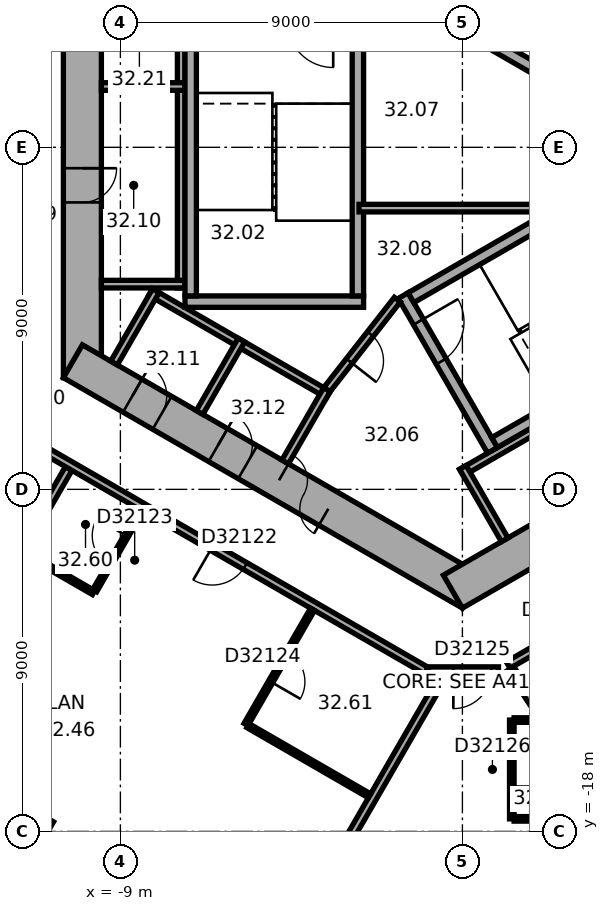
"""IFC4 building model, lengths in metres.
Left out: names, types, materials, properties, quantities, classifications, styles, units other than length and angle.
Written with IfcOpenShell. Run it as: python <this file> out.ifc"""

import sys

from ifc_helpers import new_model, si_unit, direction, frame, frame_2d, origin, origin_2d, place, context, subcontext, project, spatial, rectangle, extrude, element, fill, save


model = new_model("IFC4")
c1 = context("Model", 3, precision=1e-05, world=origin(), true_north=direction((0.0, 1.0)))
c2 = subcontext(c1, "Body", "Model", "MODEL_VIEW")
j1 = project(units=[si_unit("LENGTHUNIT", "METRE"), si_unit("PLANEANGLEUNIT", "RADIAN")], contexts=[c1])
p1 = place(None, origin())
s1 = spatial("IfcSite", under=j1, at=p1, CompositionType="ELEMENT")
p2 = place(p1, origin())
s2 = spatial("IfcBuilding", under=s1, at=p2, CompositionType="ELEMENT")
p3 = place(p2, frame((0.0, 0.0, 131.8)))
s3 = spatial("IfcBuildingStorey", under=s2, at=p3, CompositionType="ELEMENT", Elevation=131.8)
p4 = place(p3, frame((-11.46, -17.863, 0.0), z_axis=(0.0, 0.0, 1.0), x_axis=(0.866025403784, -0.5, 0.0)))
e1 = element("IfcColumn", 1, at=p4, inside=s3, PredefinedType="COLUMN", context=c2, shape_type="SweptSolid", body=[
    extrude(rectangle(XDim=1.1, YDim=0.9, at=origin_2d()), origin(), (0.0, 0.0, 1.0), 3.7),
])
p5 = place(p3, frame((-10.0, 6.062, 0.0), z_axis=(0.0, 0.0, 1.0), x_axis=(0.0, -1.0, 0.0)))
e2 = element("IfcWall", 2, at=p5, inside=s3, PredefinedType="SHEAR", context=c2, shape_type="SweptSolid", body=[
    extrude(rectangle(XDim=12.125, YDim=1.0, at=frame_2d((6.062, 0.0))), origin(), (0.0, 0.0, 1.0), 3.7),
])
p6 = place(p5, frame((6.612, 0.0, 0.0)))
e3 = element("IfcOpeningElement", 3, at=p6, cuts=e2, PredefinedType="OPENING", context=c2, shape_type="SweptSolid", body=[
    extrude(rectangle(XDim=0.9, YDim=2.1, at=frame_2d((0.45, 1.05))), frame((0.0, 0.51, 0.0), z_axis=(0.0, -1.0, 0.0), x_axis=(1.0, 0.0, 0.0)), (0.0, 0.0, 1.0), 1.02),
])
p7 = place(p3, frame((-10.25, -5.629, 0.0), z_axis=(0.0, 0.0, 1.0), x_axis=(0.866022616891, -0.50000482701, 0.0)))
e4 = element("IfcWall", 4, at=p7, inside=s3, PredefinedType="SHEAR", context=c2, shape_type="SweptSolid", body=[
    extrude(rectangle(XDim=12.125, YDim=1.0, at=frame_2d((6.062, 0.0))), origin(), (0.0, 0.0, 1.0), 3.7),
])
p8 = place(p7, frame((6.262, 0.0, 0.0)))
e5 = element("IfcOpeningElement", 5, at=p8, cuts=e4, PredefinedType="OPENING", context=c2, shape_type="SweptSolid", body=[
    extrude(rectangle(XDim=1.5, YDim=2.1, at=frame_2d((0.75, 1.05))), frame((0.0, 0.51, 0.0), z_axis=(0.0, -1.0, 0.0), x_axis=(1.0, 0.0, 0.0)), (0.0, 0.0, 1.0), 1.02),
])
p9 = place(p7, frame((1.812, 0.0, 0.0)))
e6 = element("IfcOpeningElement", 6, at=p9, cuts=e4, PredefinedType="OPENING", context=c2, shape_type="SweptSolid", body=[
    extrude(rectangle(XDim=0.9, YDim=2.1, at=frame_2d((0.45, 1.05))), frame((0.0, 0.51, 0.0), z_axis=(0.0, -1.0, 0.0), x_axis=(1.0, 0.0, 0.0)), (0.0, 0.0, 1.0), 1.02),
])
p10 = place(p7, frame((4.412, 0.0, 0.0)))
e7 = element("IfcOpeningElement", 7, at=p10, cuts=e4, PredefinedType="OPENING", context=c2, shape_type="SweptSolid", body=[
    extrude(rectangle(XDim=0.9, YDim=2.1, at=frame_2d((0.45, 1.05))), frame((0.0, 0.51, 0.0), z_axis=(0.0, -1.0, 0.0), x_axis=(1.0, 0.0, 0.0)), (0.0, 0.0, 1.0), 1.02),
])
p11 = place(p3, frame((-0.25, -11.691, 0.0), z_axis=(0.0, 0.0, 1.0), x_axis=(0.866022616891, 0.50000482701, 0.0)))
e8 = element("IfcWall", 8, at=p11, inside=s3, PredefinedType="SHEAR", context=c2, shape_type="SweptSolid", body=[
    extrude(rectangle(XDim=12.125, YDim=1.0, at=frame_2d((6.062, 0.0))), origin(), (0.0, 0.0, 1.0), 3.7),
])
p12 = place(p11, frame((4.012, 0.0, 0.0)))
e9 = element("IfcOpeningElement", 9, at=p12, cuts=e8, PredefinedType="OPENING", context=c2, shape_type="SweptSolid", body=[
    extrude(rectangle(XDim=0.9, YDim=2.1, at=frame_2d((0.45, 1.05))), frame((0.0, 0.51, 0.0), z_axis=(0.0, -1.0, 0.0), x_axis=(1.0, 0.0, 0.0)), (0.0, 0.0, 1.0), 1.02),
])
p13 = place(p11, frame((7.812, 0.0, 0.0)))
e10 = element("IfcOpeningElement", 10, at=p13, cuts=e8, PredefinedType="OPENING", context=c2, shape_type="SweptSolid", body=[
    extrude(rectangle(XDim=1.1, YDim=2.1, at=frame_2d((0.55, 1.05))), frame((0.0, 0.51, 0.0), z_axis=(0.0, -1.0, 0.0), x_axis=(1.0, 0.0, 0.0)), (0.0, 0.0, 1.0), 1.02),
])
p14 = place(p3, frame((-18.789, -14.267, 0.0), z_axis=(0.0, 0.0, 1.0), x_axis=(0.866023315909, -0.500003616288, 0.0)))
e11 = element("IfcWall", 11, at=p14, inside=s3, PredefinedType="STANDARD", context=c2, shape_type="SweptSolid", body=[
    extrude(rectangle(XDim=20.044, YDim=0.2, at=frame_2d((10.022, 0.0))), origin(), (0.0, 0.0, 1.0), 3.7),
])
p15 = place(p14, frame((1.314, 0.0, 0.9)))
e12 = element("IfcOpeningElement", 12, at=p15, cuts=e11, PredefinedType="OPENING", context=c2, shape_type="SweptSolid", body=[
    extrude(rectangle(XDim=2.4, YDim=2.0, at=frame_2d((1.2, 1.0))), frame((0.0, 0.11, 0.0), z_axis=(0.0, -1.0, 0.0), x_axis=(1.0, 0.0, 0.0)), (0.0, 0.0, 1.0), 0.22),
])
p16 = place(p14, frame((5.069, 0.0, 0.9)))
e13 = element("IfcOpeningElement", 13, at=p16, cuts=e11, PredefinedType="OPENING", context=c2, shape_type="SweptSolid", body=[
    extrude(rectangle(XDim=2.4, YDim=2.0, at=frame_2d((1.2, 1.0))), frame((0.0, 0.11, 0.0), z_axis=(0.0, -1.0, 0.0), x_axis=(1.0, 0.0, 0.0)), (0.0, 0.0, 1.0), 0.22),
])
p17 = place(p14, frame((8.823, 0.0, 0.9)))
e14 = element("IfcOpeningElement", 14, at=p17, cuts=e11, PredefinedType="OPENING", context=c2, shape_type="SweptSolid", body=[
    extrude(rectangle(XDim=2.4, YDim=2.0, at=frame_2d((1.2, 1.0))), frame((0.0, 0.11, 0.0), z_axis=(0.0, -1.0, 0.0), x_axis=(1.0, 0.0, 0.0)), (0.0, 0.0, 1.0), 0.22),
])
p18 = place(p14, frame((12.577, 0.0, 0.9)))
e15 = element("IfcOpeningElement", 15, at=p18, cuts=e11, PredefinedType="OPENING", context=c2, shape_type="SweptSolid", body=[
    extrude(rectangle(XDim=2.4, YDim=2.0, at=frame_2d((1.2, 1.0))), frame((0.0, 0.11, 0.0), z_axis=(0.0, -1.0, 0.0), x_axis=(1.0, 0.0, 0.0)), (0.0, 0.0, 1.0), 0.22),
])
p19 = place(p14, frame((16.331, 0.0, 0.9)))
e16 = element("IfcOpeningElement", 16, at=p19, cuts=e11, PredefinedType="OPENING", context=c2, shape_type="SweptSolid", body=[
    extrude(rectangle(XDim=2.4, YDim=2.0, at=frame_2d((1.2, 1.0))), frame((0.0, 0.11, 0.0), z_axis=(0.0, -1.0, 0.0), x_axis=(1.0, 0.0, 0.0)), (0.0, 0.0, 1.0), 0.22),
])
p20 = place(p3, frame((-7.4, 4.3, 0.0), z_axis=(0.0, 0.0, 1.0), x_axis=(0.0, -1.0, 0.0)))
e17 = element("IfcWall", 17, at=p20, inside=s3, PredefinedType="PARTITIONING", context=c2, shape_type="SweptSolid", body=[
    extrude(rectangle(XDim=8.0, YDim=0.2, at=frame_2d((4.0, 0.0))), origin(), (0.0, 0.0, 1.0), 3.42),
])
for number, where, z_axis, x_axis in (
    (18, (-7.3, 1.6, 0.0), (0.0, 0.0, 1.0), (-1.0, 0.0, 0.0)),
    (19, (-7.3, -3.6, 0.0), (0.0, 0.0, 1.0), (-1.0, 0.0, 0.0)),
):
    element("IfcWall", number, at=place(p3, frame(where, z_axis=z_axis, x_axis=x_axis)), inside=s3, PredefinedType="PARTITIONING", context=c2, shape_type="SweptSolid", body=[
        extrude(rectangle(XDim=2.2, YDim=0.2, at=frame_2d((1.1, 0.0))), origin(), (0.0, 0.0, 1.0), 3.42),
    ])
p21 = place(p3, frame((-8.203, -3.809, 0.0), z_axis=(0.0, 0.0, 1.0), x_axis=(0.866028230842, -0.499995103361, 0.0)))
e20 = element("IfcWall", 20, at=p21, inside=s3, PredefinedType="PARTITIONING", context=c2, shape_type="SweptSolid", body=[
    extrude(rectangle(XDim=5.4, YDim=0.2, at=frame_2d((2.7, 0.0))), origin(), (0.0, 0.0, 1.0), 3.42),
])
for number, where, z_axis, x_axis in (
    (21, (-8.067, -3.772, 0.0), (0.0, 0.0, 1.0), (-0.5, -0.866, 0.0)),
    (22, (-5.815, -5.072, 0.0), (0.0, 0.0, 1.0), (-0.5, -0.866, 0.0)),
):
    element("IfcWall", number, at=place(p3, frame(where, z_axis=z_axis, x_axis=x_axis)), inside=s3, PredefinedType="PARTITIONING", context=c2, shape_type="SweptSolid", body=[
        extrude(rectangle(XDim=2.2, YDim=0.2, at=frame_2d((1.1, 0.0))), origin(), (0.0, 0.0, 1.0), 3.42),
    ])
p22 = place(p3, frame((-3.563, -6.372, 0.0), z_axis=(0.0, 0.0, 1.0), x_axis=(-0.499994660107, -0.866028486751, 0.0)))
e23 = element("IfcWall", 23, at=p22, inside=s3, PredefinedType="PARTITIONING", context=c2, shape_type="SweptSolid", body=[
    extrude(rectangle(XDim=2.2, YDim=0.2, at=frame_2d((1.1, 0.0))), origin(), (0.0, 0.0, 1.0), 3.42),
])
p23 = place(p3, frame((-0.024, -8.559, 0.0), z_axis=(0.0, 0.0, 1.0), x_axis=(0.866026010844, 0.49999894854, 0.0)))
e24 = element("IfcWall", 24, at=p23, inside=s3, PredefinedType="PARTITIONING", context=c2, shape_type="SweptSolid", body=[
    extrude(rectangle(XDim=8.0, YDim=0.2, at=frame_2d((4.0, 0.0))), origin(), (0.0, 0.0, 1.0), 3.42),
])
p24 = place(p3, frame((0.013, -8.422, 0.0), z_axis=(0.0, 0.0, 1.0), x_axis=(0.500077893725, -0.86598042715, 0.0)))
e25 = element("IfcWall", 25, at=p24, inside=s3, PredefinedType="PARTITIONING", context=c2, shape_type="SweptSolid", body=[
    extrude(rectangle(XDim=2.2, YDim=0.2, at=frame_2d((1.1, 0.0))), origin(), (0.0, 0.0, 1.0), 3.42),
])
p25 = place(p3, frame((4.103, 0.807, 0.0), z_axis=(0.0, 0.0, 1.0), x_axis=(-0.866027801685, 0.499995846692, 0.0)))
e26 = element("IfcWall", 26, at=p25, inside=s3, PredefinedType="SHEAR", context=c2, shape_type="SweptSolid", body=[
    extrude(rectangle(XDim=7.06, YDim=0.3, at=frame_2d((3.53, 0.0))), origin(), (0.0, 0.0, 1.0), 3.42),
])
p26 = place(p3, frame((-2.6, -4.06, 0.0), z_axis=(0.0, 0.0, 1.0), x_axis=(-1.0, 0.0, 0.0)))
e27 = element("IfcWall", 27, at=p26, inside=s3, PredefinedType="SHEAR", context=c2, shape_type="SweptSolid", body=[
    extrude(rectangle(XDim=4.7, YDim=0.3, at=frame_2d((2.35, 0.0))), origin(), (0.0, 0.0, 1.0), 3.42),
])
for number, where, z_axis, x_axis in (
    (28, (-2.75, 3.15, 0.0), (0.0, 0.0, 1.0), (0.0, -1.0, 0.0)),
    (29, (-7.15, 3.15, 0.0), (0.0, 0.0, 1.0), (0.0, -1.0, 0.0)),
):
    element("IfcWall", number, at=place(p3, frame(where, z_axis=z_axis, x_axis=x_axis)), inside=s3, PredefinedType="SHEAR", context=c2, shape_type="SweptSolid", body=[
        extrude(rectangle(XDim=7.06, YDim=0.3, at=frame_2d((3.53, 0.0))), origin(), (0.0, 0.0, 1.0), 3.42),
    ])
p27 = place(p3, frame((-1.558, -3.902, 0.0), z_axis=(0.0, 0.0, 1.0), x_axis=(0.499977259774, -0.866038532462, 0.0)))
e30 = element("IfcWall", 30, at=p27, inside=s3, PredefinedType="SHEAR", context=c2, shape_type="SweptSolid", body=[
    extrude(rectangle(XDim=4.7, YDim=0.3, at=frame_2d((2.35, 0.0))), origin(), (0.0, 0.0, 1.0), 3.42),
])
p28 = place(p27, frame((0.8, 0.0, 0.0)))
e31 = element("IfcOpeningElement", 31, at=p28, cuts=e30, PredefinedType="OPENING", context=c2, shape_type="SweptSolid", body=[
    extrude(rectangle(XDim=1.2, YDim=2.1, at=frame_2d((0.6, 1.05))), frame((0.0, 0.16, 0.0), z_axis=(0.0, -1.0, 0.0), x_axis=(1.0, 0.0, 0.0)), (0.0, 0.0, 1.0), 0.32),
])
for number, where, z_axis, x_axis in (
    (32, (-1.353, -3.957, 0.0), (0.0, 0.0, 1.0), (0.866, 0.5, 0.0)),
    (33, (0.847, -7.767, 0.0), (0.0, 0.0, 1.0), (0.866, 0.5, 0.0)),
):
    element("IfcWall", number, at=place(p3, frame(where, z_axis=z_axis, x_axis=x_axis)), inside=s3, PredefinedType="SHEAR", context=c2, shape_type="SweptSolid", body=[
        extrude(rectangle(XDim=7.06, YDim=0.3, at=frame_2d((3.53, 0.0))), origin(), (0.0, 0.0, 1.0), 3.42),
    ])
p29 = place(p3, frame((-1.712, -4.008, 0.0), z_axis=(0.0, 0.0, 1.0), x_axis=(-0.616549420702, -0.787316208287, 0.0)))
e34 = element("IfcWall", 34, at=p29, inside=s3, PredefinedType="PARTITIONING", context=c2, shape_type="SweptSolid", body=[
    extrude(rectangle(XDim=3.002, YDim=0.2, at=frame_2d((1.501, 0.0))), origin(), (0.0, 0.0, 1.0), 3.42),
])
p30 = place(p29, frame((1.15, 0.0, 0.0)))
e35 = element("IfcOpeningElement", 35, at=p30, cuts=e34, PredefinedType="OPENING", context=c2, shape_type="SweptSolid", body=[
    extrude(rectangle(XDim=0.9, YDim=2.1, at=frame_2d((0.45, 1.05))), frame((0.0, 0.11, 0.0), z_axis=(0.0, -1.0, 0.0), x_axis=(1.0, 0.0, 0.0)), (0.0, 0.0, 1.0), 0.22),
])
p31 = place(p3, frame((-2.72, -1.6, 0.0), z_axis=(0.0, 0.0, 1.0), x_axis=(1.0, 0.0, 0.0)))
e36 = element("IfcWall", 36, at=p31, inside=s3, PredefinedType="PARTITIONING", context=c2, shape_type="SweptSolid", body=[
    extrude(rectangle(XDim=5.269, YDim=0.2, at=frame_2d((2.634, 0.0))), origin(), (0.0, 0.0, 1.0), 3.42),
])
p32 = place(p3, frame((-11.442, -10.325, 0.0), z_axis=(0.0, 0.0, 1.0), x_axis=(0.500012369163, 0.866018262327, 0.0)))
e37 = element("IfcWall", 37, at=p32, inside=s3, PredefinedType="PARTITIONING", context=c2, shape_type="SweptSolid", body=[
    extrude(rectangle(XDim=2.163, YDim=0.2, at=frame_2d((1.081, 0.0))), origin(), (0.0, 0.0, 1.0), 3.42),
])
p33 = place(p3, frame((-11.415, -7.728, 0.0), z_axis=(0.0, 0.0, 1.0), x_axis=(0.866022749921, -0.500004596598, 0.0)))
e38 = element("IfcWall", 38, at=p33, inside=s3, PredefinedType="PARTITIONING", context=c2, shape_type="SweptSolid", body=[
    extrude(rectangle(XDim=12.084, YDim=0.2, at=frame_2d((6.042, 0.0))), origin(), (0.0, 0.0, 1.0), 3.42),
])
p34 = place(p33, frame((5.58, 0.0, 0.0)))
e39 = element("IfcOpeningElement", 39, at=p34, cuts=e38, PredefinedType="OPENING", context=c2, shape_type="SweptSolid", body=[
    extrude(rectangle(XDim=1.0, YDim=2.1, at=frame_2d((0.5, 1.05))), frame((0.0, 0.11, 0.0), z_axis=(0.0, -1.0, 0.0), x_axis=(1.0, 0.0, 0.0)), (0.0, 0.0, 1.0), 0.22),
])
p35 = place(p3, frame((-9.706, -11.717, 0.0), z_axis=(0.0, 0.0, 1.0), x_axis=(-0.86598042715, 0.500077893725, 0.0)))
e40 = element("IfcWall", 40, at=p35, inside=s3, PredefinedType="PARTITIONING", context=c2, shape_type="SweptSolid", body=[
    extrude(rectangle(XDim=2.2, YDim=0.12, at=frame_2d((1.1, 0.0))), origin(), (0.0, 0.0, 1.0), 3.42),
])
p36 = place(p3, frame((-8.456, -9.552, 0.0), z_axis=(0.0, 0.0, 1.0), x_axis=(-0.500002508028, -0.866023955769, 0.0)))
e41 = element("IfcWall", 41, at=p36, inside=s3, PredefinedType="PARTITIONING", context=c2, shape_type="SweptSolid", body=[
    extrude(rectangle(XDim=2.44, YDim=0.12, at=frame_2d((1.22, 0.0))), origin(), (0.0, 0.0, 1.0), 3.42),
])
p37 = place(p36, frame((0.77, 0.0, 0.0)))
e42 = element("IfcOpeningElement", 42, at=p37, cuts=e41, PredefinedType="OPENING", context=c2, shape_type="SweptSolid", body=[
    extrude(rectangle(XDim=0.9, YDim=2.1, at=frame_2d((0.45, 1.05))), frame((0.0, 0.07, 0.0), z_axis=(0.0, -1.0, 0.0), x_axis=(1.0, 0.0, 0.0)), (0.0, 0.0, 1.0), 0.14),
])
p38 = place(p3, frame((-5.695, -15.188, 0.0), z_axis=(0.0, 0.0, 1.0), x_axis=(0.500010275428, 0.866019471182, 0.0)))
e43 = element("IfcWall", 43, at=p38, inside=s3, PredefinedType="PARTITIONING", context=c2, shape_type="SweptSolid", body=[
    extrude(rectangle(XDim=3.5, YDim=0.12, at=frame_2d((1.75, 0.0))), origin(), (0.0, 0.0, 1.0), 3.42),
])
p39 = place(p38, frame((1.3, 0.0, 0.0)))
e44 = element("IfcOpeningElement", 44, at=p39, cuts=e43, PredefinedType="OPENING", context=c2, shape_type="SweptSolid", body=[
    extrude(rectangle(XDim=0.9, YDim=2.1, at=frame_2d((0.45, 1.05))), frame((0.0, 0.07, 0.0), z_axis=(0.0, -1.0, 0.0), x_axis=(1.0, 0.0, 0.0)), (0.0, 0.0, 1.0), 0.14),
])
p40 = place(p3, frame((-4.732, -21.228, 0.0), z_axis=(0.0, 0.0, 1.0), x_axis=(0.500000843414, 0.866024916838, 0.0)))
e45 = element("IfcWall", 45, at=p40, inside=s3, PredefinedType="PARTITIONING", context=c2, shape_type="SweptSolid", body=[
    extrude(rectangle(XDim=8.452, YDim=0.2, at=frame_2d((4.226, 0.0))), origin(), (0.0, 0.0, 1.0), 3.42),
])
p41 = place(p3, frame((-2.444, -17.064, 0.0), z_axis=(0.0, 0.0, 1.0), x_axis=(-0.86602156466, 0.500006649499, 0.0)))
e46 = element("IfcWall", 46, at=p41, inside=s3, PredefinedType="PARTITIONING", context=c2, shape_type="SweptSolid", body=[
    extrude(rectangle(XDim=3.693, YDim=0.12, at=frame_2d((1.847, 0.0))), origin(), (0.0, 0.0, 1.0), 3.42),
])
p42 = place(p3, frame((-0.91, -13.77, 0.0), z_axis=(0.0, 0.0, 1.0), x_axis=(1.0, 0.0, 0.0)))
e47 = element("IfcWall", 47, at=p42, inside=s3, PredefinedType="PARTITIONING", context=c2, shape_type="SweptSolid", body=[
    extrude(rectangle(XDim=1.86, YDim=0.2, at=frame_2d((0.93, 0.0))), origin(), (0.0, 0.0, 1.0), 3.42),
])
p43 = place(p42, frame((0.672, 0.0, 0.0)))
e48 = element("IfcOpeningElement", 48, at=p43, cuts=e47, PredefinedType="OPENING", context=c2, shape_type="SweptSolid", body=[
    extrude(rectangle(XDim=1.0, YDim=2.1, at=frame_2d((0.5, 1.05))), frame((0.0, 0.11, 0.0), z_axis=(0.0, -1.0, 0.0), x_axis=(1.0, 0.0, 0.0)), (0.0, 0.0, 1.0), 0.22),
])
p44 = place(p3, frame((1.204, -13.623, 0.0), z_axis=(0.0, 0.0, 1.0), x_axis=(0.866031867142, 0.49998880497, 0.0)))
e49 = element("IfcWall", 49, at=p44, inside=s3, PredefinedType="PARTITIONING", context=c2, shape_type="SweptSolid", body=[
    extrude(rectangle(XDim=6.268, YDim=0.2, at=frame_2d((3.134, 0.0))), origin(), (0.0, 0.0, 1.0), 3.42),
])
p45 = place(p44, frame((1.381, 0.0, 0.0)))
e50 = element("IfcOpeningElement", 50, at=p45, cuts=e49, PredefinedType="OPENING", context=c2, shape_type="SweptSolid", body=[
    extrude(rectangle(XDim=1.0, YDim=2.1, at=frame_2d((0.5, 1.05))), frame((0.0, 0.11, 0.0), z_axis=(0.0, -1.0, 0.0), x_axis=(1.0, 0.0, 0.0)), (0.0, 0.0, 1.0), 0.22),
])
p46 = place(p44, frame((4.515, 0.0, 0.0)))
e51 = element("IfcOpeningElement", 51, at=p46, cuts=e49, PredefinedType="OPENING", context=c2, shape_type="SweptSolid", body=[
    extrude(rectangle(XDim=1.0, YDim=2.1, at=frame_2d((0.5, 1.05))), frame((0.0, 0.11, 0.0), z_axis=(0.0, -1.0, 0.0), x_axis=(1.0, 0.0, 0.0)), (0.0, 0.0, 1.0), 0.22),
])
p47 = place(p3, frame((1.3, -17.67, 0.0), z_axis=(0.0, 0.0, 1.0), x_axis=(0.0, 1.0, 0.0)))
e52 = element("IfcWall", 52, at=p47, inside=s3, PredefinedType="PARTITIONING", context=c2, shape_type="SweptSolid", body=[
    extrude(rectangle(XDim=2.6, YDim=0.12, at=frame_2d((1.3, 0.0))), origin(), (0.0, 0.0, 1.0), 3.42),
])
p48 = place(p47, frame((0.85, 0.0, 0.0)))
e53 = element("IfcOpeningElement", 53, at=p48, cuts=e52, PredefinedType="OPENING", context=c2, shape_type="SweptSolid", body=[
    extrude(rectangle(XDim=0.9, YDim=2.1, at=frame_2d((0.45, 1.05))), frame((0.0, 0.07, 0.0), z_axis=(0.0, -1.0, 0.0), x_axis=(1.0, 0.0, 0.0)), (0.0, 0.0, 1.0), 0.14),
])
p49 = place(p3, frame((1.36, -15.07, 0.0), z_axis=(0.0, 0.0, 1.0), x_axis=(1.0, 0.0, 0.0)))
e54 = element("IfcWall", 54, at=p49, inside=s3, PredefinedType="PARTITIONING", context=c2, shape_type="SweptSolid", body=[
    extrude(rectangle(XDim=0.651, YDim=0.12, at=frame_2d((0.325, 0.0))), origin(), (0.0, 0.0, 1.0), 3.42),
])
p50 = place(p3, frame((3.5, -17.67, 0.0), z_axis=(0.0, 0.0, 1.0), x_axis=(-1.0, 0.0, 0.0)))
e55 = element("IfcWall", 55, at=p50, inside=s3, PredefinedType="PARTITIONING", context=c2, shape_type="SweptSolid", body=[
    extrude(rectangle(XDim=2.14, YDim=0.12, at=frame_2d((1.07, 0.0))), origin(), (0.0, 0.0, 1.0), 3.42),
])
p51 = place(p3, frame((6.02, -20.899, 0.0), z_axis=(0.0, 0.0, 1.0), x_axis=(-0.551943990108, 0.833881185651, 0.0)))
e56 = element("IfcWall", 56, at=p51, inside=s3, PredefinedType="PARTITIONING", context=c2, shape_type="SweptSolid", body=[
    extrude(rectangle(XDim=8.615, YDim=0.2, at=frame_2d((4.308, 0.0))), origin(), (0.0, 0.0, 1.0), 3.42),
])
p52 = place(p8, origin())
e57 = element("IfcDoor", 57, at=p52, inside=s3, OperationType="DOUBLE_DOOR_SINGLE_SWING", PredefinedType="DOOR", context=c2, shape_type="SweptSolid", body=[
    extrude(rectangle(XDim=1.5, YDim=2.1, at=frame_2d((0.75, 1.05))), frame((0.0, 0.025, 0.0), z_axis=(0.0, -1.0, 0.0), x_axis=(1.0, 0.0, 0.0)), (0.0, 0.0, 1.0), 0.05),
])
fill(e5, e57)
p53 = place(p28, origin())
e58 = element("IfcDoor", 58, at=p53, inside=s3, OperationType="SINGLE_SWING_RIGHT", PredefinedType="DOOR", context=c2, shape_type="SweptSolid", body=[
    extrude(rectangle(XDim=1.2, YDim=2.1, at=frame_2d((0.6, 1.05))), frame((0.0, 0.025, 0.0), z_axis=(0.0, -1.0, 0.0), x_axis=(1.0, 0.0, 0.0)), (0.0, 0.0, 1.0), 0.05),
])
fill(e31, e58)
p54 = place(p30, origin())
e59 = element("IfcDoor", 59, at=p54, inside=s3, OperationType="SINGLE_SWING_LEFT", PredefinedType="DOOR", context=c2, shape_type="SweptSolid", body=[
    extrude(rectangle(XDim=0.9, YDim=2.1, at=frame_2d((0.45, 1.05))), frame((0.0, 0.025, 0.0), z_axis=(0.0, -1.0, 0.0), x_axis=(1.0, 0.0, 0.0)), (0.0, 0.0, 1.0), 0.05),
])
fill(e35, e59)
p55 = place(p6, origin())
e60 = element("IfcDoor", 60, at=p55, inside=s3, OperationType="SINGLE_SWING_LEFT", PredefinedType="DOOR", context=c2, shape_type="SweptSolid", body=[
    extrude(rectangle(XDim=0.9, YDim=2.1, at=frame_2d((0.45, 1.05))), frame((0.0, 0.025, 0.0), z_axis=(0.0, -1.0, 0.0), x_axis=(1.0, 0.0, 0.0)), (0.0, 0.0, 1.0), 0.05),
])
fill(e3, e60)
p56 = place(p9, origin())
e61 = element("IfcDoor", 61, at=p56, inside=s3, OperationType="SINGLE_SWING_LEFT", PredefinedType="DOOR", context=c2, shape_type="SweptSolid", body=[
    extrude(rectangle(XDim=0.9, YDim=2.1, at=frame_2d((0.45, 1.05))), frame((0.0, 0.025, 0.0), z_axis=(0.0, -1.0, 0.0), x_axis=(1.0, 0.0, 0.0)), (0.0, 0.0, 1.0), 0.05),
])
fill(e6, e61)
p57 = place(p10, origin())
e62 = element("IfcDoor", 62, at=p57, inside=s3, OperationType="SINGLE_SWING_LEFT", PredefinedType="DOOR", context=c2, shape_type="SweptSolid", body=[
    extrude(rectangle(XDim=0.9, YDim=2.1, at=frame_2d((0.45, 1.05))), frame((0.0, 0.025, 0.0), z_axis=(0.0, -1.0, 0.0), x_axis=(1.0, 0.0, 0.0)), (0.0, 0.0, 1.0), 0.05),
])
fill(e7, e62)
p58 = place(p34, origin())
e63 = element("IfcDoor", 63, at=p58, inside=s3, OperationType="SINGLE_SWING_LEFT", PredefinedType="DOOR", context=c2, shape_type="SweptSolid", body=[
    extrude(rectangle(XDim=1.0, YDim=2.1, at=frame_2d((0.5, 1.05))), frame((0.0, 0.025, 0.0), z_axis=(0.0, -1.0, 0.0), x_axis=(1.0, 0.0, 0.0)), (0.0, 0.0, 1.0), 0.05),
])
fill(e39, e63)
p59 = place(p37, origin())
e64 = element("IfcDoor", 64, at=p59, inside=s3, OperationType="SINGLE_SWING_LEFT", PredefinedType="DOOR", context=c2, shape_type="SweptSolid", body=[
    extrude(rectangle(XDim=0.9, YDim=2.1, at=frame_2d((0.45, 1.05))), frame((0.0, 0.025, 0.0), z_axis=(0.0, -1.0, 0.0), x_axis=(1.0, 0.0, 0.0)), (0.0, 0.0, 1.0), 0.05),
])
fill(e42, e64)
p60 = place(p39, origin())
e65 = element("IfcDoor", 65, at=p60, inside=s3, OperationType="SINGLE_SWING_LEFT", PredefinedType="DOOR", context=c2, shape_type="SweptSolid", body=[
    extrude(rectangle(XDim=0.9, YDim=2.1, at=frame_2d((0.45, 1.05))), frame((0.0, 0.025, 0.0), z_axis=(0.0, -1.0, 0.0), x_axis=(1.0, 0.0, 0.0)), (0.0, 0.0, 1.0), 0.05),
])
fill(e44, e65)
p61 = place(p43, origin())
e66 = element("IfcDoor", 66, at=p61, inside=s3, OperationType="SINGLE_SWING_LEFT", PredefinedType="DOOR", context=c2, shape_type="SweptSolid", body=[
    extrude(rectangle(XDim=1.0, YDim=2.1, at=frame_2d((0.5, 1.05))), frame((0.0, 0.025, 0.0), z_axis=(0.0, -1.0, 0.0), x_axis=(1.0, 0.0, 0.0)), (0.0, 0.0, 1.0), 0.05),
])
fill(e48, e66)
p62 = place(p48, origin())
e67 = element("IfcDoor", 67, at=p62, inside=s3, OperationType="SINGLE_SWING_LEFT", PredefinedType="DOOR", context=c2, shape_type="SweptSolid", body=[
    extrude(rectangle(XDim=0.9, YDim=2.1, at=frame_2d((0.45, 1.05))), frame((0.0, 0.025, 0.0), z_axis=(0.0, -1.0, 0.0), x_axis=(1.0, 0.0, 0.0)), (0.0, 0.0, 1.0), 0.05),
])
fill(e53, e67)
save(model, sys.argv[1])
